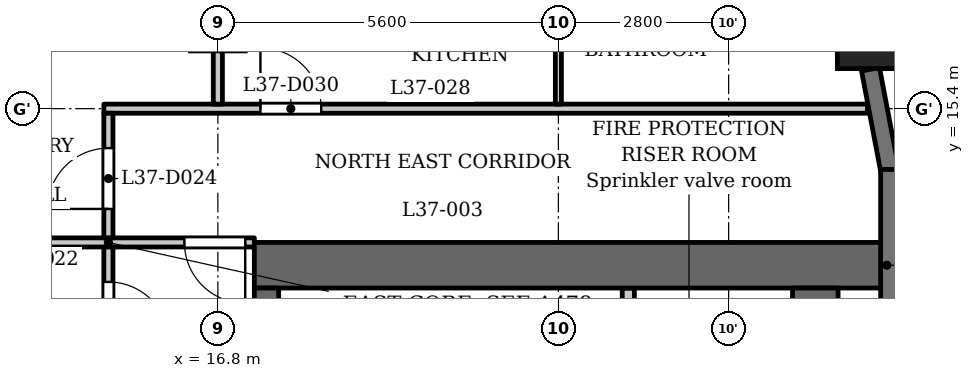
"""IFC4 building model, lengths in metres.
Left out: names, types, materials, properties, quantities, classifications, styles, units other than length and angle.
Written with IfcOpenShell. Run it as: python <this file> out.ifc"""

import sys

from ifc_helpers import new_model, si_unit, direction, frame, frame_2d, origin, origin_2d, place, context, subcontext, project, spatial, rectangle, extrude, element, fill, save


model = new_model("IFC4")
c1 = context("Model", 3, precision=1e-05, world=origin(), true_north=direction((0.0, 1.0)))
c2 = subcontext(c1, "Body", "Model", "MODEL_VIEW")
j1 = project(units=[si_unit("LENGTHUNIT", "METRE"), si_unit("PLANEANGLEUNIT", "RADIAN")], contexts=[c1])
p1 = place(None, origin())
s1 = spatial("IfcSite", under=j1, at=p1, CompositionType="ELEMENT")
p2 = place(p1, origin())
s2 = spatial("IfcBuilding", under=s1, at=p2, CompositionType="ELEMENT")
p3 = place(p2, frame((0.0, 0.0, 146.6)))
s3 = spatial("IfcBuildingStorey", under=s2, at=p3, CompositionType="ELEMENT", Elevation=146.6)
p4 = place(p3, frame((27.538, 16.609, 0.0), z_axis=(0.0, 0.0, 1.0), x_axis=(1.0, 0.0, 0.0)))
e1 = element("IfcColumn", 1, at=p4, inside=s3, PredefinedType="COLUMN", context=c2, shape_type="SweptSolid", body=[
    extrude(rectangle(XDim=1.1, YDim=1.1, at=origin_2d()), origin(), (0.0, 0.0, 1.0), 3.5),
])
p5 = place(p3, frame((27.85, 11.75, 0.0), z_axis=(0.0, 0.0, 1.0), x_axis=(0.0, 1.0, 0.0)))
e2 = element("IfcWall", 2, at=p5, inside=s3, PredefinedType="SOLIDWALL", context=c2, shape_type="SweptSolid", body=[
    extrude(rectangle(XDim=2.65, YDim=0.3, at=frame_2d((1.325, 0.0))), origin(), (0.0, 0.0, 1.0), 2.45),
])
p6 = place(p3, frame((27.853, 14.372, 0.0), z_axis=(0.0, 0.0, 1.0), x_axis=(-0.187302784601, 0.982302227871, 0.0)))
e3 = element("IfcWall", 3, at=p6, inside=s3, PredefinedType="SOLIDWALL", context=c2, shape_type="SweptSolid", body=[
    extrude(rectangle(XDim=1.706, YDim=0.3, at=frame_2d((0.853, 0.0))), origin(), (0.0, 0.0, 1.0), 2.45),
])
p7 = place(p3, frame((17.4, 12.825, 0.0), z_axis=(0.0, 0.0, 1.0), x_axis=(1.0, 0.0, 0.0)))
e4 = element("IfcWall", 4, at=p7, inside=s3, PredefinedType="SHEAR", context=c2, shape_type="SweptSolid", body=[
    extrude(rectangle(XDim=10.4, YDim=0.75, at=frame_2d((5.2, 0.0))), origin(), (0.0, 0.0, 1.0), 3.2),
])
p8 = place(p3, frame((17.6, -12.45, 0.0), z_axis=(0.0, 0.0, 1.0), x_axis=(0.0, 1.0, 0.0)))
e5 = element("IfcWall", 5, at=p8, inside=s3, PredefinedType="SHEAR", context=c2, shape_type="SweptSolid", body=[
    extrude(rectangle(XDim=24.9, YDim=0.4, at=frame_2d((12.45, 0.0))), origin(), (0.0, 0.0, 1.0), 3.2),
])
p9 = place(p8, frame((6.325, 0.0, 0.0)))
e6 = element("IfcOpeningElement", 6, at=p9, cuts=e5, PredefinedType="OPENING", context=c2, shape_type="SweptSolid", body=[
    extrude(rectangle(XDim=0.9, YDim=2.1, at=frame_2d((0.45, 1.05))), frame((0.0, 0.21, 0.0), z_axis=(0.0, -1.0, 0.0), x_axis=(1.0, 0.0, 0.0)), (0.0, 0.0, 1.0), 0.42),
])
p10 = place(p8, frame((9.925, 0.0, 0.0)))
e7 = element("IfcOpeningElement", 7, at=p10, cuts=e5, PredefinedType="OPENING", context=c2, shape_type="SweptSolid", body=[
    extrude(rectangle(XDim=0.9, YDim=2.1, at=frame_2d((0.45, 1.05))), frame((0.0, 0.21, 0.0), z_axis=(0.0, -1.0, 0.0), x_axis=(1.0, 0.0, 0.0)), (0.0, 0.0, 1.0), 0.42),
])
p11 = place(p8, frame((15.6, 0.0, 0.0)))
e8 = element("IfcOpeningElement", 8, at=p11, cuts=e5, PredefinedType="OPENING", context=c2, shape_type="SweptSolid", body=[
    extrude(rectangle(XDim=1.1, YDim=2.1, at=frame_2d((0.55, 1.05))), frame((0.0, 0.21, 0.0), z_axis=(0.0, -1.0, 0.0), x_axis=(1.0, 0.0, 0.0)), (0.0, 0.0, 1.0), 0.42),
])
p12 = place(p8, frame((18.0, 0.0, 0.0)))
e9 = element("IfcOpeningElement", 9, at=p12, cuts=e5, PredefinedType="OPENING", context=c2, shape_type="SweptSolid", body=[
    extrude(rectangle(XDim=1.1, YDim=2.1, at=frame_2d((0.55, 1.05))), frame((0.0, 0.21, 0.0), z_axis=(0.0, -1.0, 0.0), x_axis=(1.0, 0.0, 0.0)), (0.0, 0.0, 1.0), 0.42),
])
p13 = place(p8, frame((23.025, 0.0, 0.0)))
e10 = element("IfcOpeningElement", 10, at=p13, cuts=e5, PredefinedType="OPENING", context=c2, shape_type="SweptSolid", body=[
    extrude(rectangle(XDim=1.1, YDim=2.1, at=frame_2d((0.55, 1.05))), frame((0.0, 0.21, 0.0), z_axis=(0.0, -1.0, 0.0), x_axis=(1.0, 0.0, 0.0)), (0.0, 0.0, 1.0), 0.42),
])
p14 = place(p8, frame((0.775, 0.0, 0.0)))
e11 = element("IfcOpeningElement", 11, at=p14, cuts=e5, PredefinedType="OPENING", context=c2, shape_type="SweptSolid", body=[
    extrude(rectangle(XDim=1.1, YDim=2.1, at=frame_2d((0.55, 1.05))), frame((0.0, 0.21, 0.0), z_axis=(0.0, -1.0, 0.0), x_axis=(1.0, 0.0, 0.0)), (0.0, 0.0, 1.0), 0.42),
])
p15 = place(p8, frame((12.925, 0.0, 0.0)))
e12 = element("IfcOpeningElement", 12, at=p15, cuts=e5, PredefinedType="OPENING", context=c2, shape_type="SweptSolid", body=[
    extrude(rectangle(XDim=1.8, YDim=2.1, at=frame_2d((0.9, 1.05))), frame((0.0, 0.21, 0.0), z_axis=(0.0, -1.0, 0.0), x_axis=(1.0, 0.0, 0.0)), (0.0, 0.0, 1.0), 0.42),
])
p16 = place(p3, frame((26.625, -12.45, 0.0), z_axis=(0.0, 0.0, 1.0), x_axis=(0.0, 1.0, 0.0)))
e13 = element("IfcWall", 13, at=p16, inside=s3, PredefinedType="SHEAR", context=c2, shape_type="SweptSolid", body=[
    extrude(rectangle(XDim=24.9, YDim=0.75, at=frame_2d((12.45, 0.0))), origin(), (0.0, 0.0, 1.0), 3.2),
])
p17 = place(p3, frame((23.55, 9.8, 0.0), z_axis=(0.0, 0.0, 1.0), x_axis=(0.0, 1.0, 0.0)))
e14 = element("IfcWall", 14, at=p17, inside=s3, PredefinedType="PARTITIONING", context=c2, shape_type="SweptSolid", body=[
    extrude(rectangle(XDim=2.65, YDim=0.2, at=frame_2d((1.325, 0.0))), origin(), (0.0, 0.0, 1.0), 3.2),
])
p18 = place(p17, frame((0.875, 0.0, 0.0)))
e15 = element("IfcOpeningElement", 15, at=p18, cuts=e14, PredefinedType="OPENING", context=c2, shape_type="SweptSolid", body=[
    extrude(rectangle(XDim=0.9, YDim=2.1, at=frame_2d((0.45, 1.05))), frame((0.0, 0.11, 0.0), z_axis=(0.0, -1.0, 0.0), x_axis=(1.0, 0.0, 0.0)), (0.0, 0.0, 1.0), 0.22),
])
p19 = place(p3, frame((-17.4, 13.2, 0.0), z_axis=(0.0, 0.0, 1.0), x_axis=(1.0, 0.0, 0.0)))
e16 = element("IfcWall", 16, at=p19, inside=s3, PredefinedType="PARTITIONING", context=c2, shape_type="SweptSolid", body=[
    extrude(rectangle(XDim=34.8, YDim=0.15, at=frame_2d((17.4, 0.0))), origin(), (0.0, 0.0, 1.0), 3.2),
])
p20 = place(p19, frame((0.25, 0.0, 0.0)))
e17 = element("IfcOpeningElement", 17, at=p20, cuts=e16, PredefinedType="OPENING", context=c2, shape_type="SweptSolid", body=[
    extrude(rectangle(XDim=1.0, YDim=2.1, at=frame_2d((0.5, 1.05))), frame((0.0, 0.085, 0.0), z_axis=(0.0, -1.0, 0.0), x_axis=(1.0, 0.0, 0.0)), (0.0, 0.0, 1.0), 0.17),
])
p21 = place(p19, frame((33.65, 0.0, 0.0)))
e18 = element("IfcOpeningElement", 18, at=p21, cuts=e16, PredefinedType="OPENING", context=c2, shape_type="SweptSolid", body=[
    extrude(rectangle(XDim=1.0, YDim=2.1, at=frame_2d((0.5, 1.05))), frame((0.0, 0.085, 0.0), z_axis=(0.0, -1.0, 0.0), x_axis=(1.0, 0.0, 0.0)), (0.0, 0.0, 1.0), 0.17),
])
p22 = place(p19, frame((13.75, 0.0, 0.0)))
e19 = element("IfcOpeningElement", 19, at=p22, cuts=e16, PredefinedType="OPENING", context=c2, shape_type="SweptSolid", body=[
    extrude(rectangle(XDim=1.0, YDim=2.1, at=frame_2d((0.5, 1.05))), frame((0.0, 0.085, 0.0), z_axis=(0.0, -1.0, 0.0), x_axis=(1.0, 0.0, 0.0)), (0.0, 0.0, 1.0), 0.17),
])
p23 = place(p3, frame((14.925, 15.4, 0.0), z_axis=(0.0, 0.0, 1.0), x_axis=(1.0, 0.0, 0.0)))
e20 = element("IfcWall", 20, at=p23, inside=s3, PredefinedType="PARTITIONING", context=c2, shape_type="SweptSolid", body=[
    extrude(rectangle(XDim=12.559, YDim=0.15, at=frame_2d((6.279, 0.0))), origin(), (0.0, 0.0, 1.0), 3.2),
])
p24 = place(p23, frame((2.575, 0.0, 0.0)))
e21 = element("IfcOpeningElement", 21, at=p24, cuts=e20, PredefinedType="OPENING", context=c2, shape_type="SweptSolid", body=[
    extrude(rectangle(XDim=1.0, YDim=2.1, at=frame_2d((0.5, 1.05))), frame((0.0, 0.085, 0.0), z_axis=(0.0, -1.0, 0.0), x_axis=(1.0, 0.0, 0.0)), (0.0, 0.0, 1.0), 0.17),
])
p25 = place(p3, frame((15.0, 6.769, 0.0), z_axis=(0.0, 0.0, 1.0), x_axis=(0.0, 1.0, 0.0)))
e22 = element("IfcWall", 22, at=p25, inside=s3, PredefinedType="PARTITIONING", context=c2, shape_type="SweptSolid", body=[
    extrude(rectangle(XDim=6.356, YDim=0.15, at=frame_2d((3.178, 0.0))), origin(), (0.0, 0.0, 1.0), 3.2),
])
p26 = place(p25, frame((4.781, 0.0, 0.0)))
e23 = element("IfcOpeningElement", 23, at=p26, cuts=e22, PredefinedType="OPENING", context=c2, shape_type="SweptSolid", body=[
    extrude(rectangle(XDim=1.0, YDim=2.1, at=frame_2d((0.5, 1.05))), frame((0.0, 0.085, 0.0), z_axis=(0.0, -1.0, 0.0), x_axis=(1.0, 0.0, 0.0)), (0.0, 0.0, 1.0), 0.17),
])
p27 = place(p3, frame((15.0, 13.275, 0.0), z_axis=(0.0, 0.0, 1.0), x_axis=(0.0, 1.0, 0.0)))
e24 = element("IfcWall", 24, at=p27, inside=s3, PredefinedType="PARTITIONING", context=c2, shape_type="SweptSolid", body=[
    extrude(rectangle(XDim=2.05, YDim=0.15, at=frame_2d((1.025, 0.0))), origin(), (0.0, 0.0, 1.0), 3.2),
])
p28 = place(p27, frame((0.476, 0.0, 0.0)))
e25 = element("IfcOpeningElement", 25, at=p28, cuts=e24, PredefinedType="OPENING", context=c2, shape_type="SweptSolid", body=[
    extrude(rectangle(XDim=1.0, YDim=2.1, at=frame_2d((0.5, 1.05))), frame((0.0, 0.085, 0.0), z_axis=(0.0, -1.0, 0.0), x_axis=(1.0, 0.0, 0.0)), (0.0, 0.0, 1.0), 0.17),
])
p29 = place(p3, frame((16.8, 15.475, 0.0), z_axis=(0.0, 0.0, 1.0), x_axis=(0.0, 1.0, 0.0)))
e26 = element("IfcWall", 26, at=p29, inside=s3, PredefinedType="PARTITIONING", context=c2, shape_type="SweptSolid", body=[
    extrude(rectangle(XDim=7.455, YDim=0.15, at=frame_2d((3.728, 0.0))), origin(), (0.0, 0.0, 1.0), 3.2),
])
p30 = place(p3, frame((22.4, 15.475, 0.0), z_axis=(0.0, 0.0, 1.0), x_axis=(0.0, 1.0, 0.0)))
e27 = element("IfcWall", 27, at=p30, inside=s3, PredefinedType="PARTITIONING", context=c2, shape_type="SweptSolid", body=[
    extrude(rectangle(XDim=2.275, YDim=0.1, at=frame_2d((1.137, 0.0))), origin(), (0.0, 0.0, 1.0), 3.2),
])
p31 = place(p26, origin())
e28 = element("IfcDoor", 28, at=p31, inside=s3, OperationType="SINGLE_SWING_LEFT", PredefinedType="DOOR", context=c2, shape_type="SweptSolid", body=[
    extrude(rectangle(XDim=1.0, YDim=2.1, at=frame_2d((0.5, 1.05))), frame((0.0, 0.025, 0.0), z_axis=(0.0, -1.0, 0.0), x_axis=(1.0, 0.0, 0.0)), (0.0, 0.0, 1.0), 0.05),
])
fill(e23, e28)
p32 = place(p21, origin())
e29 = element("IfcDoor", 29, at=p32, inside=s3, OperationType="SINGLE_SWING_RIGHT", PredefinedType="DOOR", context=c2, shape_type="SweptSolid", body=[
    extrude(rectangle(XDim=1.0, YDim=2.1, at=frame_2d((0.5, 1.05))), frame((0.0, 0.025, 0.0), z_axis=(0.0, -1.0, 0.0), x_axis=(1.0, 0.0, 0.0)), (0.0, 0.0, 1.0), 0.05),
])
fill(e18, e29)
p33 = place(p28, origin())
e30 = element("IfcDoor", 30, at=p33, inside=s3, OperationType="SINGLE_SWING_RIGHT", PredefinedType="DOOR", context=c2, shape_type="SweptSolid", body=[
    extrude(rectangle(XDim=1.0, YDim=2.1, at=frame_2d((0.5, 1.05))), frame((0.0, 0.025, 0.0), z_axis=(0.0, -1.0, 0.0), x_axis=(1.0, 0.0, 0.0)), (0.0, 0.0, 1.0), 0.05),
])
fill(e25, e30)
p34 = place(p24, origin())
e31 = element("IfcDoor", 31, at=p34, inside=s3, OperationType="SINGLE_SWING_RIGHT", PredefinedType="DOOR", context=c2, shape_type="SweptSolid", body=[
    extrude(rectangle(XDim=1.0, YDim=2.1, at=frame_2d((0.5, 1.05))), frame((0.0, 0.025, 0.0), z_axis=(0.0, -1.0, 0.0), x_axis=(1.0, 0.0, 0.0)), (0.0, 0.0, 1.0), 0.05),
])
fill(e21, e31)
save(model, sys.argv[1])
